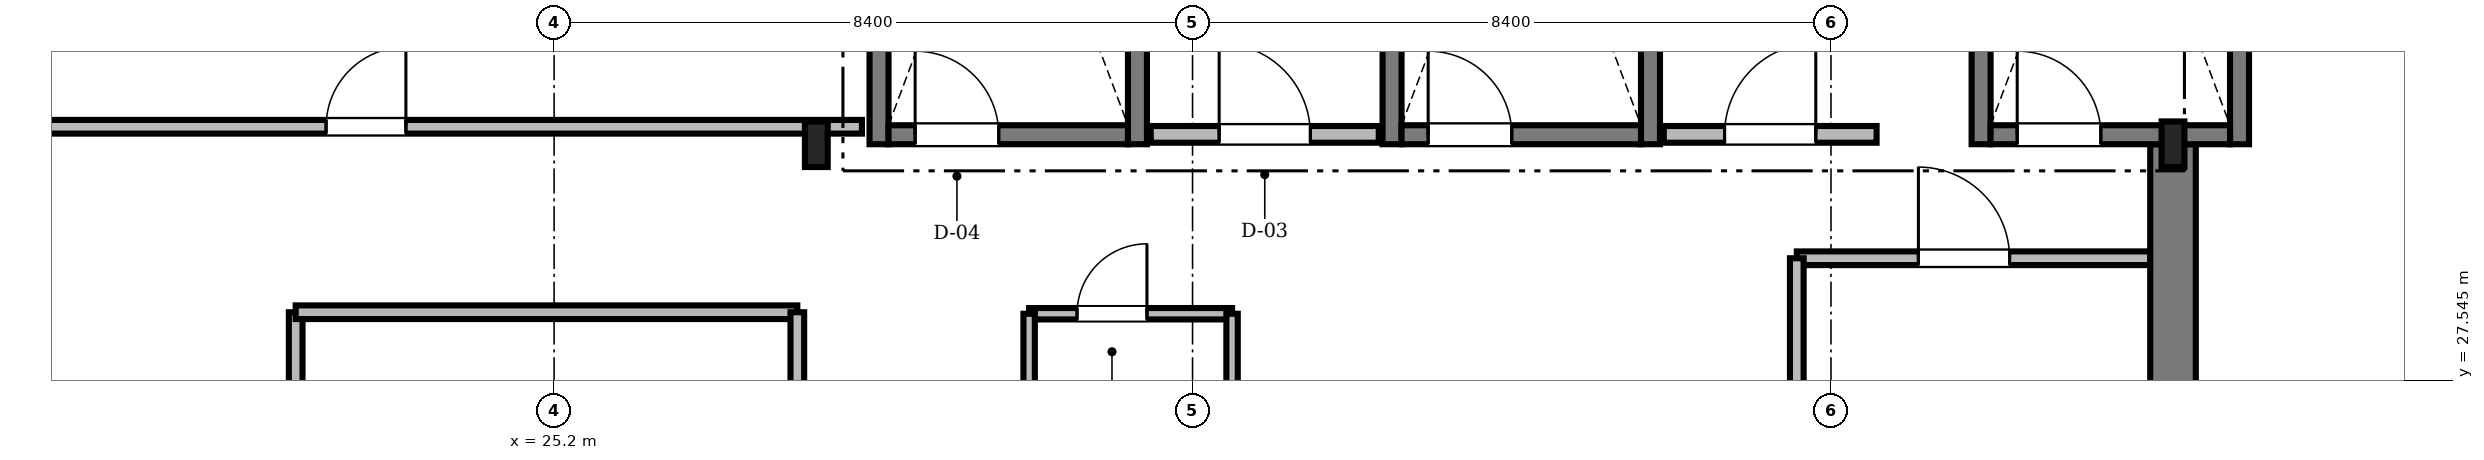
"""IFC4 building model, lengths in metres.
Left out: names, types, materials, properties, quantities, classifications, styles, units other than length and angle.
Written with IfcOpenShell. Run it as: python <this file> out.ifc"""

import sys

from ifc_helpers import new_model, si_unit, direction, frame, frame_2d, origin, origin_2d, place, context, subcontext, project, spatial, rectangle, i_section, extrude, source, transform, mapped, element, fill, save


model = new_model("IFC4")
c1 = context("Model", 3, precision=1e-05, world=origin(), true_north=direction((0.0, 1.0)))
c2 = subcontext(c1, "Body", "Model", "MODEL_VIEW")
j1 = project(units=[si_unit("LENGTHUNIT", "METRE"), si_unit("PLANEANGLEUNIT", "RADIAN")], contexts=[c1])
p1 = place(None, origin())
s1 = spatial("IfcSite", under=j1, at=p1, CompositionType="ELEMENT")
p2 = place(p1, origin())
s2 = spatial("IfcBuilding", under=s1, at=p2, CompositionType="ELEMENT")
p3 = place(p2, frame((0.0, 0.0, 262.45)))
s3 = spatial("IfcBuildingStorey", under=s2, at=p3, CompositionType="ELEMENT", Elevation=262.45)
m1 = source(origin(), c2, "Body", "SweptSolid", [
    extrude(rectangle(XDim=13.15, YDim=0.6, at=frame_2d((6.575, 0.0))), origin(), (0.0, 0.0, 1.0), 3.65),
])
p4 = place(p3, frame((46.5, 17.5, 0.0), z_axis=(0.0, 0.0, 1.0), x_axis=(0.0, 1.0, 0.0)))
e1 = element("IfcWall", 1, at=p4, inside=s3, PredefinedType="SHEAR", context=c2, shape_type="MappedRepresentation", body=[
    mapped(m1, transform((0.0, 0.0, 0.0), scale=1.0)),
])
m2 = source(origin(), c2, "Body", "SweptSolid", [
    extrude(i_section(OverallWidth=0.3, OverallDepth=0.6, WebThickness=0.015, FlangeThickness=0.03, FilletRadius=0.027, at=origin_2d()), origin(), (0.0, 0.0, 1.0), 3.65),
])
for number, where, z_axis, x_axis in (
    (2, (28.65, 30.65, 0.0), (0.0, 0.0, 1.0), (1.0, 0.0, 0.0)),
    (3, (46.5, 30.65, 0.0), (0.0, 0.0, 1.0), (1.0, 0.0, 0.0)),
):
    element("IfcColumn", number, at=place(p3, frame(where, z_axis=z_axis, x_axis=x_axis)), inside=s3, PredefinedType="COLUMN", context=c2, shape_type="MappedRepresentation", body=[
        mapped(m2, transform((0.0, 0.0, 0.0), scale=1.0)),
    ])
m3 = source(origin(), c2, "Body", "SweptSolid", [
    extrude(rectangle(XDim=9.35, YDim=0.25, at=frame_2d((4.675, 0.0))), origin(), (0.0, 0.0, 1.0), 3.75),
])
for number, where, z_axis, x_axis in (
    (4, (29.475, 30.65, 0.0), (0.0, 0.0, 1.0), (0.0, 1.0, 0.0)),
    (5, (32.875, 30.65, 0.0), (0.0, 0.0, 1.0), (0.0, 1.0, 0.0)),
):
    element("IfcWall", number, at=place(p3, frame(where, z_axis=z_axis, x_axis=x_axis)), inside=s3, PredefinedType="SOLIDWALL", context=c2, shape_type="MappedRepresentation", body=[
        mapped(m3, transform((0.0, 0.0, 0.0), scale=1.0)),
    ])
m4 = source(origin(), c2, "Body", "SweptSolid", [
    extrude(rectangle(XDim=3.15, YDim=0.25, at=frame_2d((1.575, 0.0))), origin(), (0.0, 0.0, 1.0), 3.75),
])
p5 = place(p3, frame((29.6, 30.775, 0.0), z_axis=(0.0, 0.0, 1.0), x_axis=(1.0, 0.0, 0.0)))
e6 = element("IfcWall", 6, at=p5, inside=s3, PredefinedType="SOLIDWALL", context=c2, shape_type="MappedRepresentation", body=[
    mapped(m4, transform((0.0, 0.0, 0.0), scale=1.0)),
])
m5 = source(origin(), c2, "Body", "SweptSolid", [
    extrude(rectangle(XDim=1.1, YDim=2.2, at=frame_2d((0.55, 1.1))), frame((0.0, 0.135, 0.0), z_axis=(0.0, -1.0, 0.0), x_axis=(1.0, 0.0, 0.0)), (0.0, 0.0, 1.0), 0.27),
])
p6 = place(p5, frame((0.35, 0.0, 0.0)))
e7 = element("IfcOpeningElement", 7, at=p6, cuts=e6, PredefinedType="OPENING", context=c2, shape_type="MappedRepresentation", body=[
    mapped(m5, transform((0.0, 0.0, 0.0), scale=1.0)),
])
for number, where, z_axis, x_axis in (
    (8, (36.225, 30.65, 0.0), (0.0, 0.0, 1.0), (0.0, 1.0, 0.0)),
    (9, (39.625, 30.65, 0.0), (0.0, 0.0, 1.0), (0.0, 1.0, 0.0)),
):
    element("IfcWall", number, at=place(p3, frame(where, z_axis=z_axis, x_axis=x_axis)), inside=s3, PredefinedType="SOLIDWALL", context=c2, shape_type="MappedRepresentation", body=[
        mapped(m3, transform((0.0, 0.0, 0.0), scale=1.0)),
    ])
p7 = place(p3, frame((36.35, 30.775, 0.0), z_axis=(0.0, 0.0, 1.0), x_axis=(1.0, 0.0, 0.0)))
e10 = element("IfcWall", 10, at=p7, inside=s3, PredefinedType="SOLIDWALL", context=c2, shape_type="MappedRepresentation", body=[
    mapped(m4, transform((0.0, 0.0, 0.0), scale=1.0)),
])
p8 = place(p7, frame((0.35, 0.0, 0.0)))
e11 = element("IfcOpeningElement", 11, at=p8, cuts=e10, PredefinedType="OPENING", context=c2, shape_type="MappedRepresentation", body=[
    mapped(m5, transform((0.0, 0.0, 0.0), scale=1.0)),
])
for number, where, z_axis, x_axis in (
    (12, (43.975, 30.65, 0.0), (0.0, 0.0, 1.0), (0.0, 1.0, 0.0)),
    (13, (47.375, 30.65, 0.0), (0.0, 0.0, 1.0), (0.0, 1.0, 0.0)),
):
    element("IfcWall", number, at=place(p3, frame(where, z_axis=z_axis, x_axis=x_axis)), inside=s3, PredefinedType="SOLIDWALL", context=c2, shape_type="MappedRepresentation", body=[
        mapped(m3, transform((0.0, 0.0, 0.0), scale=1.0)),
    ])
p9 = place(p3, frame((44.1, 30.775, 0.0), z_axis=(0.0, 0.0, 1.0), x_axis=(1.0, 0.0, 0.0)))
e14 = element("IfcWall", 14, at=p9, inside=s3, PredefinedType="SOLIDWALL", context=c2, shape_type="MappedRepresentation", body=[
    mapped(m4, transform((0.0, 0.0, 0.0), scale=1.0)),
])
p10 = place(p9, frame((0.35, 0.0, 0.0)))
e15 = element("IfcOpeningElement", 15, at=p10, cuts=e14, PredefinedType="OPENING", context=c2, shape_type="MappedRepresentation", body=[
    mapped(m5, transform((0.0, 0.0, 0.0), scale=1.0)),
])
m6 = source(origin(), c2, "Body", "SweptSolid", [
    extrude(rectangle(XDim=3.0, YDim=0.22, at=frame_2d((1.5, 0.0))), origin(), (0.0, 0.0, 1.0), 3.65),
])
p11 = place(p3, frame((33.05, 30.78, 0.0), z_axis=(0.0, 0.0, 1.0), x_axis=(1.0, 0.0, 0.0)))
e16 = element("IfcWall", 16, at=p11, inside=s3, PredefinedType="SOLIDWALL", context=c2, shape_type="MappedRepresentation", body=[
    mapped(m6, transform((0.0, 0.0, 0.0), scale=1.0)),
])
m7 = source(origin(), c2, "Body", "SweptSolid", [
    extrude(rectangle(XDim=1.2, YDim=2.2, at=frame_2d((0.6, 1.1))), frame((0.0, 0.12, 0.0), z_axis=(0.0, -1.0, 0.0), x_axis=(1.0, 0.0, 0.0)), (0.0, 0.0, 1.0), 0.24),
])
p12 = place(p11, frame((0.9, 0.0, 0.0)))
e17 = element("IfcOpeningElement", 17, at=p12, cuts=e16, PredefinedType="OPENING", context=c2, shape_type="MappedRepresentation", body=[
    mapped(m7, transform((0.0, 0.0, 0.0), scale=1.0)),
])
m8 = source(origin(), c2, "Body", "SweptSolid", [
    extrude(rectangle(XDim=2.8, YDim=0.22, at=frame_2d((1.4, 0.0))), origin(), (0.0, 0.0, 1.0), 3.65),
])
p13 = place(p3, frame((39.8, 30.78, 0.0), z_axis=(0.0, 0.0, 1.0), x_axis=(1.0, 0.0, 0.0)))
e18 = element("IfcWall", 18, at=p13, inside=s3, PredefinedType="SOLIDWALL", context=c2, shape_type="MappedRepresentation", body=[
    mapped(m8, transform((0.0, 0.0, 0.0), scale=1.0)),
])
p14 = place(p13, frame((0.8, 0.0, 0.0)))
e19 = element("IfcOpeningElement", 19, at=p14, cuts=e18, PredefinedType="OPENING", context=c2, shape_type="MappedRepresentation", body=[
    mapped(m7, transform((0.0, 0.0, 0.0), scale=1.0)),
])
m9 = source(origin(), c2, "Body", "SweptSolid", [
    extrude(rectangle(XDim=12.248, YDim=0.18, at=frame_2d((6.124, 0.0))), origin(), (0.0, 0.0, 1.0), 2.892),
])
p15 = place(p3, frame((17.002, 30.88, 0.0), z_axis=(0.0, 0.0, 1.0), x_axis=(1.0, 0.0, 0.0)))
e20 = element("IfcWall", 20, at=p15, inside=s3, PredefinedType="PARTITIONING", context=c2, shape_type="MappedRepresentation", body=[
    mapped(m9, transform((0.0, 0.0, 0.0), scale=1.0)),
])
m10 = source(origin(), c2, "Body", "SweptSolid", [
    extrude(rectangle(XDim=1.05, YDim=2.2, at=frame_2d((0.525, 1.1))), frame((0.0, 0.1, 0.0), z_axis=(0.0, -1.0, 0.0), x_axis=(1.0, 0.0, 0.0)), (0.0, 0.0, 1.0), 0.2),
])
p16 = place(p15, frame((5.198, 0.0, 0.0)))
e21 = element("IfcOpeningElement", 21, at=p16, cuts=e20, PredefinedType="OPENING", context=c2, shape_type="MappedRepresentation", body=[
    mapped(m10, transform((0.0, 0.0, 0.0), scale=1.0)),
])
m11 = source(origin(), c2, "Body", "SweptSolid", [
    extrude(rectangle(XDim=6.54, YDim=0.18, at=frame_2d((3.27, 0.0))), origin(), (0.0, 0.0, 1.0), 3.092),
])
p17 = place(p3, frame((21.8, 21.9, 0.0), z_axis=(0.0, 0.0, 1.0), x_axis=(0.0, 1.0, 0.0)))
e22 = element("IfcWall", 22, at=p17, inside=s3, PredefinedType="PARTITIONING", context=c2, shape_type="MappedRepresentation", body=[
    mapped(m11, transform((0.0, 0.0, 0.0), scale=1.0)),
])
p18 = place(p17, frame((2.2, 0.0, 0.0)))
e23 = element("IfcOpeningElement", 23, at=p18, cuts=e22, PredefinedType="OPENING", context=c2, shape_type="MappedRepresentation", body=[
    mapped(m10, transform((0.0, 0.0, 0.0), scale=1.0)),
])
m12 = source(origin(), c2, "Body", "SweptSolid", [
    extrude(rectangle(XDim=4.648, YDim=0.18, at=frame_2d((2.324, 0.0))), origin(), (0.0, 0.0, 1.0), 3.282),
])
p19 = place(p3, frame((41.55, 29.15, 0.0), z_axis=(0.0, 0.0, 1.0), x_axis=(1.0, 0.0, 0.0)))
e24 = element("IfcWall", 24, at=p19, inside=s3, PredefinedType="PARTITIONING", context=c2, shape_type="MappedRepresentation", body=[
    mapped(m12, transform((0.0, 0.0, 0.0), scale=1.0)),
])
m13 = source(origin(), c2, "Body", "SweptSolid", [
    extrude(rectangle(XDim=1.2, YDim=2.2, at=frame_2d((0.6, 1.1))), frame((0.0, 0.1, 0.0), z_axis=(0.0, -1.0, 0.0), x_axis=(1.0, 0.0, 0.0)), (0.0, 0.0, 1.0), 0.2),
])
p20 = place(p19, frame((1.6, 0.0, 0.0)))
e25 = element("IfcOpeningElement", 25, at=p20, cuts=e24, PredefinedType="OPENING", context=c2, shape_type="MappedRepresentation", body=[
    mapped(m13, transform((0.0, 0.0, 0.0), scale=1.0)),
])
m14 = source(origin(), c2, "Body", "SweptSolid", [
    extrude(rectangle(XDim=2.67, YDim=0.15, at=frame_2d((1.335, 0.0))), origin(), (0.0, 0.0, 1.0), 3.282),
])
p21 = place(p3, frame((31.45, 28.42, 0.0), z_axis=(0.0, 0.0, 1.0), x_axis=(1.0, 0.0, 0.0)))
e26 = element("IfcWall", 26, at=p21, inside=s3, PredefinedType="PARTITIONING", context=c2, shape_type="MappedRepresentation", body=[
    mapped(m14, transform((0.0, 0.0, 0.0), scale=1.0)),
])
m15 = source(origin(), c2, "Body", "SweptSolid", [
    extrude(rectangle(XDim=0.92, YDim=2.1, at=frame_2d((0.46, 1.05))), frame((0.0, 0.085, 0.0), z_axis=(0.0, -1.0, 0.0), x_axis=(1.0, 0.0, 0.0)), (0.0, 0.0, 1.0), 0.17),
])
p22 = place(p21, frame((0.63, 0.0, 0.0)))
e27 = element("IfcOpeningElement", 27, at=p22, cuts=e26, PredefinedType="OPENING", context=c2, shape_type="MappedRepresentation", body=[
    mapped(m15, transform((0.0, 0.0, 0.0), scale=1.0)),
])
m16 = source(origin(), c2, "Body", "SweptSolid", [
    extrude(rectangle(XDim=6.6, YDim=0.18, at=frame_2d((3.3, 0.0))), origin(), (0.0, 0.0, 1.0), 3.092),
])
p23 = place(p3, frame((21.8, 28.44, 0.0), z_axis=(0.0, 0.0, 1.0), x_axis=(1.0, 0.0, 0.0)))
e28 = element("IfcWall", 28, at=p23, inside=s3, PredefinedType="PARTITIONING", context=c2, shape_type="MappedRepresentation", body=[
    mapped(m16, transform((0.0, 0.0, 0.0), scale=1.0)),
])
p24 = place(p3, frame((28.4, 21.9, 0.0), z_axis=(0.0, 0.0, 1.0), x_axis=(0.0, 1.0, 0.0)))
e29 = element("IfcWall", 29, at=p24, inside=s3, PredefinedType="PARTITIONING", context=c2, shape_type="MappedRepresentation", body=[
    mapped(m11, transform((0.0, 0.0, 0.0), scale=1.0)),
])
m17 = source(origin(), c2, "Body", "SweptSolid", [
    extrude(rectangle(XDim=2.35, YDim=0.18, at=frame_2d((1.175, 0.0))), origin(), (0.0, 0.0, 1.0), 3.282),
])
p25 = place(p3, frame((41.55, 26.8, 0.0), z_axis=(0.0, 0.0, 1.0), x_axis=(0.0, 1.0, 0.0)))
e30 = element("IfcWall", 30, at=p25, inside=s3, PredefinedType="PARTITIONING", context=c2, shape_type="MappedRepresentation", body=[
    mapped(m17, transform((0.0, 0.0, 0.0), scale=1.0)),
])
m18 = source(origin(), c2, "Body", "SweptSolid", [
    extrude(rectangle(XDim=1.6, YDim=0.15, at=frame_2d((0.8, 0.0))), origin(), (0.0, 0.0, 1.0), 3.192),
])
for number, where, z_axis, x_axis in (
    (31, (31.45, 26.82, 0.0), (0.0, 0.0, 1.0), (0.0, 1.0, 0.0)),
    (32, (34.12, 26.82, 0.0), (0.0, 0.0, 1.0), (0.0, 1.0, 0.0)),
):
    element("IfcWall", number, at=place(p3, frame(where, z_axis=z_axis, x_axis=x_axis)), inside=s3, PredefinedType="PARTITIONING", context=c2, shape_type="MappedRepresentation", body=[
        mapped(m18, transform((0.0, 0.0, 0.0), scale=1.0)),
    ])
m19 = source(origin(), c2, "Body", "SweptSolid", [
    extrude(rectangle(XDim=1.1, YDim=2.2, at=frame_2d((0.55, 1.1))), frame((0.0, 0.025, 0.0), z_axis=(0.0, -1.0, 0.0), x_axis=(1.0, 0.0, 0.0)), (0.0, 0.0, 1.0), 0.05),
])
p26 = place(p6, origin())
e33 = element("IfcDoor", 33, at=p26, inside=s3, OperationType="SINGLE_SWING_LEFT", PredefinedType="DOOR", context=c2, shape_type="MappedRepresentation", body=[
    mapped(m19, transform((0.0, 0.0, 0.0), scale=1.0)),
])
fill(e7, e33)
p27 = place(p8, origin())
e34 = element("IfcDoor", 34, at=p27, inside=s3, OperationType="SINGLE_SWING_LEFT", PredefinedType="DOOR", context=c2, shape_type="MappedRepresentation", body=[
    mapped(m19, transform((0.0, 0.0, 0.0), scale=1.0)),
])
fill(e11, e34)
p28 = place(p10, origin())
e35 = element("IfcDoor", 35, at=p28, inside=s3, OperationType="SINGLE_SWING_LEFT", PredefinedType="DOOR", context=c2, shape_type="MappedRepresentation", body=[
    mapped(m19, transform((0.0, 0.0, 0.0), scale=1.0)),
])
fill(e15, e35)
m20 = source(origin(), c2, "Body", "SweptSolid", [
    extrude(rectangle(XDim=1.2, YDim=2.2, at=frame_2d((0.6, 1.1))), frame((0.0, 0.025, 0.0), z_axis=(0.0, -1.0, 0.0), x_axis=(1.0, 0.0, 0.0)), (0.0, 0.0, 1.0), 0.05),
])
p29 = place(p12, origin())
e36 = element("IfcDoor", 36, at=p29, inside=s3, OperationType="SINGLE_SWING_LEFT", PredefinedType="DOOR", context=c2, shape_type="MappedRepresentation", body=[
    mapped(m20, transform((0.0, 0.0, 0.0), scale=1.0)),
])
fill(e17, e36)
p30 = place(p14, origin())
e37 = element("IfcDoor", 37, at=p30, inside=s3, OperationType="SINGLE_SWING_RIGHT", PredefinedType="DOOR", context=c2, shape_type="MappedRepresentation", body=[
    mapped(m20, transform((0.0, 0.0, 0.0), scale=1.0)),
])
fill(e19, e37)
m21 = source(origin(), c2, "Body", "SweptSolid", [
    extrude(rectangle(XDim=1.05, YDim=2.2, at=frame_2d((0.525, 1.1))), frame((0.0, 0.025, 0.0), z_axis=(0.0, -1.0, 0.0), x_axis=(1.0, 0.0, 0.0)), (0.0, 0.0, 1.0), 0.05),
])
p31 = place(p16, origin())
e38 = element("IfcDoor", 38, at=p31, inside=s3, OperationType="SINGLE_SWING_RIGHT", PredefinedType="DOOR", context=c2, shape_type="MappedRepresentation", body=[
    mapped(m21, transform((0.0, 0.0, 0.0), scale=1.0)),
])
fill(e21, e38)
p32 = place(p20, origin())
e39 = element("IfcDoor", 39, at=p32, inside=s3, OperationType="SINGLE_SWING_LEFT", PredefinedType="DOOR", context=c2, shape_type="MappedRepresentation", body=[
    mapped(m20, transform((0.0, 0.0, 0.0), scale=1.0)),
])
fill(e25, e39)
m22 = source(origin(), c2, "Body", "SweptSolid", [
    extrude(rectangle(XDim=0.92, YDim=2.1, at=frame_2d((0.46, 1.05))), frame((0.0, 0.025, 0.0), z_axis=(0.0, -1.0, 0.0), x_axis=(1.0, 0.0, 0.0)), (0.0, 0.0, 1.0), 0.05),
])
p33 = place(p22, origin())
e40 = element("IfcDoor", 40, at=p33, inside=s3, OperationType="SINGLE_SWING_RIGHT", PredefinedType="DOOR", context=c2, shape_type="MappedRepresentation", body=[
    mapped(m22, transform((0.0, 0.0, 0.0), scale=1.0)),
])
fill(e27, e40)
save(model, sys.argv[1])
